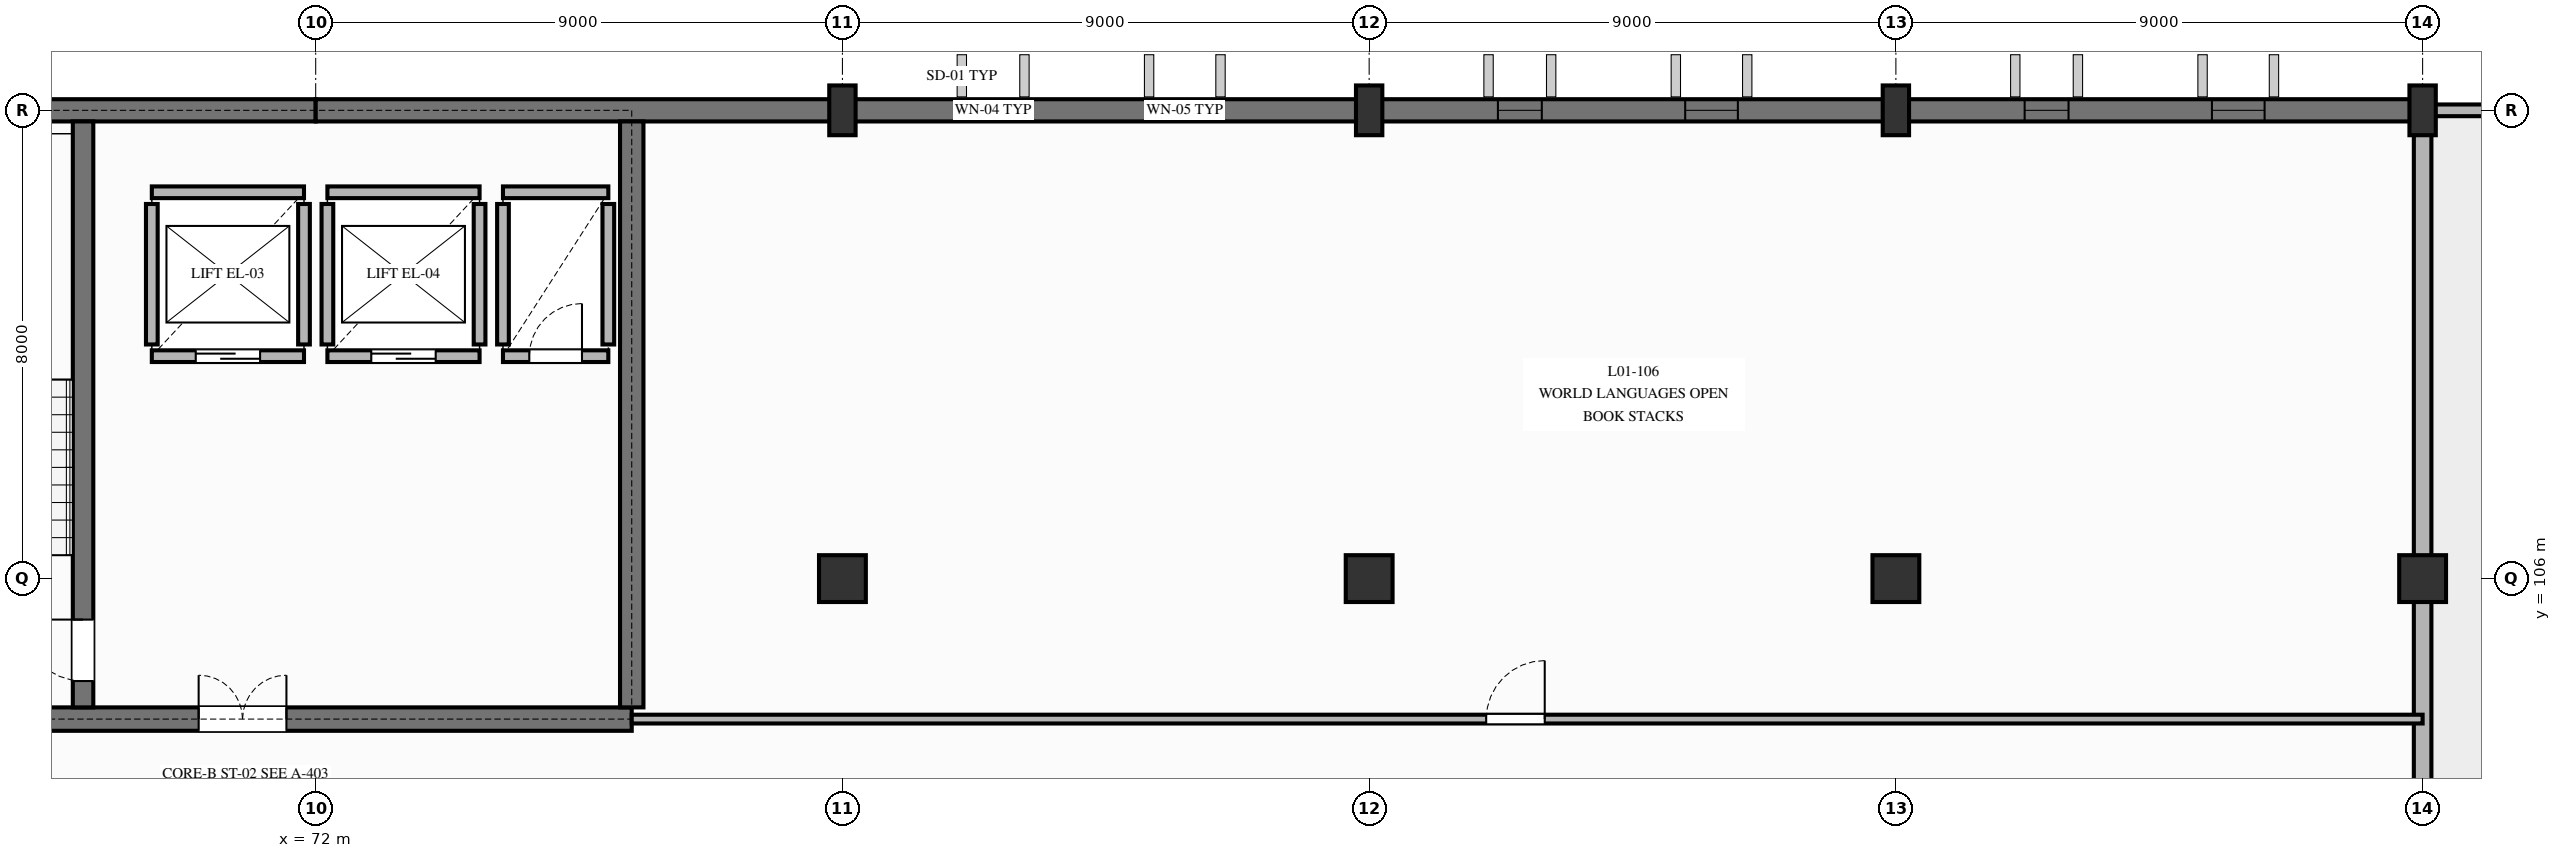
"""IFC4 building model, lengths in metres.
Left out: names, types, materials, properties, quantities, classifications, styles, units other than length and angle.
Written with IfcOpenShell. Run it as: python <this file> out.ifc"""

import sys

from ifc_helpers import new_model, si_unit, direction, frame, frame_2d, origin, origin_2d, place, context, subcontext, project, spatial, rectangle, extrude, element, fill, save


model = new_model("IFC4")
c1 = context("Model", 3, precision=1e-05, world=origin(), true_north=direction((0.0, 1.0)))
c2 = subcontext(c1, "Body", "Model", "MODEL_VIEW")
j1 = project(units=[si_unit("LENGTHUNIT", "METRE"), si_unit("PLANEANGLEUNIT", "RADIAN")], contexts=[c1])
p1 = place(None, origin())
s1 = spatial("IfcSite", under=j1, at=p1, CompositionType="ELEMENT")
p2 = place(p1, origin())
s2 = spatial("IfcBuilding", under=s1, at=p2, CompositionType="ELEMENT")
p3 = place(p2, frame((0.0, 0.0, 5.1)))
s3 = spatial("IfcBuildingStorey", under=s2, at=p3, CompositionType="ELEMENT", Elevation=5.1)
p4 = place(p3, frame((81.0, 106.0, 0.0), z_axis=(0.0, 0.0, 1.0), x_axis=(1.0, 0.0, 0.0)))
e1 = element("IfcColumn", 1, at=p4, inside=s3, PredefinedType="COLUMN", context=c2, shape_type="SweptSolid", body=[
    extrude(rectangle(XDim=0.8, YDim=0.8, at=origin_2d()), origin(), (0.0, 0.0, 1.0), 3.84),
])
p5 = place(p3, frame((81.0, 114.0, 0.0), z_axis=(0.0, 0.0, 1.0), x_axis=(0.0, 1.0, 0.0)))
e2 = element("IfcColumn", 2, at=p5, inside=s3, PredefinedType="COLUMN", context=c2, shape_type="SweptSolid", body=[
    extrude(rectangle(XDim=0.45, YDim=0.85, at=origin_2d()), origin(), (0.0, 0.0, 1.0), 3.84),
])
p6 = place(p3, frame((90.0, 106.0, 0.0), z_axis=(0.0, 0.0, 1.0), x_axis=(1.0, 0.0, 0.0)))
e3 = element("IfcColumn", 3, at=p6, inside=s3, PredefinedType="COLUMN", context=c2, shape_type="SweptSolid", body=[
    extrude(rectangle(XDim=0.8, YDim=0.8, at=origin_2d()), origin(), (0.0, 0.0, 1.0), 3.84),
])
p7 = place(p3, frame((90.0, 114.0, 0.0), z_axis=(0.0, 0.0, 1.0), x_axis=(0.0, 1.0, 0.0)))
e4 = element("IfcColumn", 4, at=p7, inside=s3, PredefinedType="COLUMN", context=c2, shape_type="SweptSolid", body=[
    extrude(rectangle(XDim=0.45, YDim=0.85, at=origin_2d()), origin(), (0.0, 0.0, 1.0), 3.84),
])
p8 = place(p3, frame((99.0, 106.0, 0.0), z_axis=(0.0, 0.0, 1.0), x_axis=(1.0, 0.0, 0.0)))
e5 = element("IfcColumn", 5, at=p8, inside=s3, PredefinedType="COLUMN", context=c2, shape_type="SweptSolid", body=[
    extrude(rectangle(XDim=0.8, YDim=0.8, at=origin_2d()), origin(), (0.0, 0.0, 1.0), 3.84),
])
p9 = place(p3, frame((99.0, 114.0, 0.0), z_axis=(0.0, 0.0, 1.0), x_axis=(0.0, 1.0, 0.0)))
e6 = element("IfcColumn", 6, at=p9, inside=s3, PredefinedType="COLUMN", context=c2, shape_type="SweptSolid", body=[
    extrude(rectangle(XDim=0.45, YDim=0.85, at=origin_2d()), origin(), (0.0, 0.0, 1.0), 3.84),
])
p10 = place(p3, frame((108.0, 106.0, 0.0), z_axis=(0.0, 0.0, 1.0), x_axis=(1.0, 0.0, 0.0)))
e7 = element("IfcColumn", 7, at=p10, inside=s3, PredefinedType="COLUMN", context=c2, shape_type="SweptSolid", body=[
    extrude(rectangle(XDim=0.8, YDim=0.8, at=origin_2d()), origin(), (0.0, 0.0, 1.0), 3.84),
])
p11 = place(p3, frame((108.0, 114.0, 0.0), z_axis=(0.0, 0.0, 1.0), x_axis=(0.0, 1.0, 0.0)))
e8 = element("IfcColumn", 8, at=p11, inside=s3, PredefinedType="COLUMN", context=c2, shape_type="SweptSolid", body=[
    extrude(rectangle(XDim=0.45, YDim=0.85, at=origin_2d()), origin(), (0.0, 0.0, 1.0), 3.84),
])
for number, where, z_axis, x_axis in (
    (9, (63.0, 114.0, 0.0), (0.0, 0.0, 1.0), (1.0, 0.0, 0.0)),
    (10, (72.0, 114.0, 0.0), (0.0, 0.0, 1.0), (1.0, 0.0, 0.0)),
):
    element("IfcWall", number, at=place(p3, frame(where, z_axis=z_axis, x_axis=x_axis)), inside=s3, PredefinedType="SOLIDWALL", context=c2, shape_type="SweptSolid", body=[
        extrude(rectangle(XDim=9.0, YDim=0.38, at=frame_2d((4.5, 0.0))), origin(), (0.0, 0.0, 1.0), 3.55),
    ])
p12 = place(p3, frame((81.0, 114.0, 0.0), z_axis=(0.0, 0.0, 1.0), x_axis=(1.0, 0.0, 0.0)))
e11 = element("IfcWall", 11, at=p12, inside=s3, PredefinedType="SOLIDWALL", context=c2, shape_type="SweptSolid", body=[
    extrude(rectangle(XDim=9.0, YDim=0.38, at=frame_2d((4.5, 0.0))), origin(), (0.0, 0.0, 1.0), 3.55),
])
p13 = place(p12, frame((2.2, 0.0, 0.615)))
e12 = element("IfcOpeningElement", 12, at=p13, cuts=e11, PredefinedType="OPENING", context=c2, shape_type="SweptSolid", body=[
    extrude(rectangle(XDim=0.75, YDim=2.2, at=frame_2d((0.375, 1.1))), frame((0.0, 0.2, 0.0), z_axis=(0.0, -1.0, 0.0), x_axis=(1.0, 0.0, 0.0)), (0.0, 0.0, 1.0), 0.4),
])
p14 = place(p12, frame((5.4, 0.0, 0.615)))
e13 = element("IfcOpeningElement", 13, at=p14, cuts=e11, PredefinedType="OPENING", context=c2, shape_type="SweptSolid", body=[
    extrude(rectangle(XDim=0.9, YDim=2.2, at=frame_2d((0.45, 1.1))), frame((0.0, 0.2, 0.0), z_axis=(0.0, -1.0, 0.0), x_axis=(1.0, 0.0, 0.0)), (0.0, 0.0, 1.0), 0.4),
])
p15 = place(p3, frame((90.0, 114.0, 0.0), z_axis=(0.0, 0.0, 1.0), x_axis=(1.0, 0.0, 0.0)))
e14 = element("IfcWall", 14, at=p15, inside=s3, PredefinedType="SOLIDWALL", context=c2, shape_type="SweptSolid", body=[
    extrude(rectangle(XDim=9.0, YDim=0.38, at=frame_2d((4.5, 0.0))), origin(), (0.0, 0.0, 1.0), 3.55),
])
p16 = place(p15, frame((2.2, 0.0, 0.615)))
e15 = element("IfcOpeningElement", 15, at=p16, cuts=e14, PredefinedType="OPENING", context=c2, shape_type="SweptSolid", body=[
    extrude(rectangle(XDim=0.75, YDim=2.2, at=frame_2d((0.375, 1.1))), frame((0.0, 0.2, 0.0), z_axis=(0.0, -1.0, 0.0), x_axis=(1.0, 0.0, 0.0)), (0.0, 0.0, 1.0), 0.4),
])
p17 = place(p15, frame((5.4, 0.0, 0.615)))
e16 = element("IfcOpeningElement", 16, at=p17, cuts=e14, PredefinedType="OPENING", context=c2, shape_type="SweptSolid", body=[
    extrude(rectangle(XDim=0.9, YDim=2.2, at=frame_2d((0.45, 1.1))), frame((0.0, 0.2, 0.0), z_axis=(0.0, -1.0, 0.0), x_axis=(1.0, 0.0, 0.0)), (0.0, 0.0, 1.0), 0.4),
])
p18 = place(p3, frame((99.0, 114.0, 0.0), z_axis=(0.0, 0.0, 1.0), x_axis=(1.0, 0.0, 0.0)))
e17 = element("IfcWall", 17, at=p18, inside=s3, PredefinedType="SOLIDWALL", context=c2, shape_type="SweptSolid", body=[
    extrude(rectangle(XDim=9.0, YDim=0.38, at=frame_2d((4.5, 0.0))), origin(), (0.0, 0.0, 1.0), 3.55),
])
p19 = place(p18, frame((2.2, 0.0, 0.575)))
e18 = element("IfcOpeningElement", 18, at=p19, cuts=e17, PredefinedType="OPENING", context=c2, shape_type="SweptSolid", body=[
    extrude(rectangle(XDim=0.75, YDim=2.2, at=frame_2d((0.375, 1.1))), frame((0.0, 0.2, 0.0), z_axis=(0.0, -1.0, 0.0), x_axis=(1.0, 0.0, 0.0)), (0.0, 0.0, 1.0), 0.4),
])
p20 = place(p18, frame((5.4, 0.0, 0.575)))
e19 = element("IfcOpeningElement", 19, at=p20, cuts=e17, PredefinedType="OPENING", context=c2, shape_type="SweptSolid", body=[
    extrude(rectangle(XDim=0.9, YDim=2.2, at=frame_2d((0.45, 1.1))), frame((0.0, 0.2, 0.0), z_axis=(0.0, -1.0, 0.0), x_axis=(1.0, 0.0, 0.0)), (0.0, 0.0, 1.0), 0.4),
])
p21 = place(p3, frame((108.0, 82.2, 0.0), z_axis=(0.0, 0.0, 1.0), x_axis=(0.0, 1.0, 0.0)))
e20 = element("IfcWall", 20, at=p21, inside=s3, PredefinedType="SOLIDWALL", context=c2, shape_type="SweptSolid", body=[
    extrude(rectangle(XDim=31.8, YDim=0.3, at=frame_2d((15.9, 0.0))), origin(), (0.0, 0.0, 1.0), 2.815),
])
p22 = place(p21, frame((3.2, 0.0, 0.595)))
e21 = element("IfcOpeningElement", 21, at=p22, cuts=e20, PredefinedType="OPENING", context=c2, shape_type="SweptSolid", body=[
    extrude(rectangle(XDim=1.5, YDim=2.1, at=frame_2d((0.75, 1.05))), frame((0.0, 0.16, 0.0), z_axis=(0.0, -1.0, 0.0), x_axis=(1.0, 0.0, 0.0)), (0.0, 0.0, 1.0), 0.32),
])
p23 = place(p21, frame((10.5, 0.0, 0.845)))
e22 = element("IfcOpeningElement", 22, at=p23, cuts=e20, PredefinedType="OPENING", context=c2, shape_type="SweptSolid", body=[
    extrude(rectangle(XDim=1.35, YDim=1.85, at=frame_2d((0.675, 0.925))), frame((0.0, 0.16, 0.0), z_axis=(0.0, -1.0, 0.0), x_axis=(1.0, 0.0, 0.0)), (0.0, 0.0, 1.0), 0.32),
])
p24 = place(p3, frame((145.8, 114.0, 0.0), z_axis=(0.0, 0.0, 1.0), x_axis=(-1.0, 0.0, 0.0)))
e23 = element("IfcWall", 23, at=p24, inside=s3, PredefinedType="PARAPET", context=c2, shape_type="SweptSolid", body=[
    extrude(rectangle(XDim=37.6, YDim=0.2, at=frame_2d((18.8, 0.0))), origin(), (0.0, 0.0, 1.0), 0.72),
])
p25 = place(p3, frame((64.2, 103.6, 0.0), z_axis=(0.0, 0.0, 1.0), x_axis=(1.0, 0.0, 0.0)))
e24 = element("IfcWall", 24, at=p25, inside=s3, PredefinedType="SHEAR", context=c2, shape_type="SweptSolid", body=[
    extrude(rectangle(XDim=13.2, YDim=0.4, at=frame_2d((6.6, 0.0))), origin(), (0.0, 0.0, 1.0), 3.55),
])
p26 = place(p25, frame((5.8, 0.0, 0.0)))
e25 = element("IfcOpeningElement", 25, at=p26, cuts=e24, PredefinedType="OPENING", context=c2, shape_type="SweptSolid", body=[
    extrude(rectangle(XDim=1.5, YDim=2.2, at=frame_2d((0.75, 1.1))), frame((0.0, 0.21, 0.0), z_axis=(0.0, -1.0, 0.0), x_axis=(1.0, 0.0, 0.0)), (0.0, 0.0, 1.0), 0.42),
])
p27 = place(p3, frame((77.4, 103.8, 0.0), z_axis=(0.0, 0.0, 1.0), x_axis=(0.0, 1.0, 0.0)))
e26 = element("IfcWall", 26, at=p27, inside=s3, PredefinedType="SHEAR", context=c2, shape_type="SweptSolid", body=[
    extrude(rectangle(XDim=10.01, YDim=0.4, at=frame_2d((5.005, 0.0))), origin(), (0.0, 0.0, 1.0), 3.55),
])
p28 = place(p3, frame((68.025, 103.8, 0.0), z_axis=(0.0, 0.0, 1.0), x_axis=(0.0, 1.0, 0.0)))
e27 = element("IfcWall", 27, at=p28, inside=s3, PredefinedType="SHEAR", context=c2, shape_type="SweptSolid", body=[
    extrude(rectangle(XDim=10.01, YDim=0.35, at=frame_2d((5.005, 0.0))), origin(), (0.0, 0.0, 1.0), 3.55),
])
p29 = place(p28, frame((0.45, 0.0, 0.0)))
e28 = element("IfcOpeningElement", 28, at=p29, cuts=e27, PredefinedType="OPENING", context=c2, shape_type="SweptSolid", body=[
    extrude(rectangle(XDim=1.05, YDim=2.2, at=frame_2d((0.525, 1.1))), frame((0.0, 0.185, 0.0), z_axis=(0.0, -1.0, 0.0), x_axis=(1.0, 0.0, 0.0)), (0.0, 0.0, 1.0), 0.37),
])
p30 = place(p3, frame((69.2, 109.8, 0.0), z_axis=(0.0, 0.0, 1.0), x_axis=(1.0, 0.0, 0.0)))
e29 = element("IfcWall", 29, at=p30, inside=s3, PredefinedType="PARTITIONING", context=c2, shape_type="SweptSolid", body=[
    extrude(rectangle(XDim=2.6, YDim=0.2, at=frame_2d((1.3, 0.0))), origin(), (0.0, 0.0, 1.0), 3.55),
])
p31 = place(p30, frame((0.75, 0.0, 0.0)))
e30 = element("IfcOpeningElement", 30, at=p31, cuts=e29, PredefinedType="OPENING", context=c2, shape_type="SweptSolid", body=[
    extrude(rectangle(XDim=1.1, YDim=2.15, at=frame_2d((0.55, 1.075))), frame((0.0, 0.11, 0.0), z_axis=(0.0, -1.0, 0.0), x_axis=(1.0, 0.0, 0.0)), (0.0, 0.0, 1.0), 0.22),
])
p32 = place(p3, frame((69.2, 112.6, 0.0), z_axis=(0.0, 0.0, 1.0), x_axis=(1.0, 0.0, 0.0)))
e31 = element("IfcWall", 31, at=p32, inside=s3, PredefinedType="PARTITIONING", context=c2, shape_type="SweptSolid", body=[
    extrude(rectangle(XDim=2.6, YDim=0.2, at=frame_2d((1.3, 0.0))), origin(), (0.0, 0.0, 1.0), 3.55),
])
for number, where, z_axis, x_axis in (
    (32, (69.2, 110.0, 0.0), (0.0, 0.0, 1.0), (0.0, 1.0, 0.0)),
    (33, (71.8, 110.0, 0.0), (0.0, 0.0, 1.0), (0.0, 1.0, 0.0)),
):
    element("IfcWall", number, at=place(p3, frame(where, z_axis=z_axis, x_axis=x_axis)), inside=s3, PredefinedType="PARTITIONING", context=c2, shape_type="SweptSolid", body=[
        extrude(rectangle(XDim=2.4, YDim=0.2, at=frame_2d((1.2, 0.0))), origin(), (0.0, 0.0, 1.0), 3.55),
    ])
p33 = place(p3, frame((72.2, 109.8, 0.0), z_axis=(0.0, 0.0, 1.0), x_axis=(1.0, 0.0, 0.0)))
e34 = element("IfcWall", 34, at=p33, inside=s3, PredefinedType="PARTITIONING", context=c2, shape_type="SweptSolid", body=[
    extrude(rectangle(XDim=2.6, YDim=0.2, at=frame_2d((1.3, 0.0))), origin(), (0.0, 0.0, 1.0), 3.55),
])
p34 = place(p33, frame((0.75, 0.0, 0.0)))
e35 = element("IfcOpeningElement", 35, at=p34, cuts=e34, PredefinedType="OPENING", context=c2, shape_type="SweptSolid", body=[
    extrude(rectangle(XDim=1.1, YDim=2.15, at=frame_2d((0.55, 1.075))), frame((0.0, 0.11, 0.0), z_axis=(0.0, -1.0, 0.0), x_axis=(1.0, 0.0, 0.0)), (0.0, 0.0, 1.0), 0.22),
])
p35 = place(p3, frame((72.2, 112.6, 0.0), z_axis=(0.0, 0.0, 1.0), x_axis=(1.0, 0.0, 0.0)))
e36 = element("IfcWall", 36, at=p35, inside=s3, PredefinedType="PARTITIONING", context=c2, shape_type="SweptSolid", body=[
    extrude(rectangle(XDim=2.6, YDim=0.2, at=frame_2d((1.3, 0.0))), origin(), (0.0, 0.0, 1.0), 3.55),
])
for number, where, z_axis, x_axis in (
    (37, (72.2, 110.0, 0.0), (0.0, 0.0, 1.0), (0.0, 1.0, 0.0)),
    (38, (74.8, 110.0, 0.0), (0.0, 0.0, 1.0), (0.0, 1.0, 0.0)),
):
    element("IfcWall", number, at=place(p3, frame(where, z_axis=z_axis, x_axis=x_axis)), inside=s3, PredefinedType="PARTITIONING", context=c2, shape_type="SweptSolid", body=[
        extrude(rectangle(XDim=2.4, YDim=0.2, at=frame_2d((1.2, 0.0))), origin(), (0.0, 0.0, 1.0), 3.55),
    ])
p36 = place(p3, frame((75.2, 109.8, 0.0), z_axis=(0.0, 0.0, 1.0), x_axis=(1.0, 0.0, 0.0)))
e39 = element("IfcWall", 39, at=p36, inside=s3, PredefinedType="PARTITIONING", context=c2, shape_type="SweptSolid", body=[
    extrude(rectangle(XDim=1.8, YDim=0.2, at=frame_2d((0.9, 0.0))), origin(), (0.0, 0.0, 1.0), 3.55),
])
p37 = place(p36, frame((0.45, 0.0, 0.0)))
e40 = element("IfcOpeningElement", 40, at=p37, cuts=e39, PredefinedType="OPENING", context=c2, shape_type="SweptSolid", body=[
    extrude(rectangle(XDim=0.9, YDim=2.1, at=frame_2d((0.45, 1.05))), frame((0.0, 0.11, 0.0), z_axis=(0.0, -1.0, 0.0), x_axis=(1.0, 0.0, 0.0)), (0.0, 0.0, 1.0), 0.22),
])
p38 = place(p3, frame((75.2, 112.6, 0.0), z_axis=(0.0, 0.0, 1.0), x_axis=(1.0, 0.0, 0.0)))
e41 = element("IfcWall", 41, at=p38, inside=s3, PredefinedType="PARTITIONING", context=c2, shape_type="SweptSolid", body=[
    extrude(rectangle(XDim=1.8, YDim=0.2, at=frame_2d((0.9, 0.0))), origin(), (0.0, 0.0, 1.0), 3.55),
])
for number, where, z_axis, x_axis in (
    (42, (75.2, 110.0, 0.0), (0.0, 0.0, 1.0), (0.0, 1.0, 0.0)),
    (43, (77.0, 110.0, 0.0), (0.0, 0.0, 1.0), (0.0, 1.0, 0.0)),
):
    element("IfcWall", number, at=place(p3, frame(where, z_axis=z_axis, x_axis=x_axis)), inside=s3, PredefinedType="PARTITIONING", context=c2, shape_type="SweptSolid", body=[
        extrude(rectangle(XDim=2.4, YDim=0.2, at=frame_2d((1.2, 0.0))), origin(), (0.0, 0.0, 1.0), 3.55),
    ])
p39 = place(p3, frame((77.4, 103.6, 0.0), z_axis=(0.0, 0.0, 1.0), x_axis=(1.0, 0.0, 0.0)))
e44 = element("IfcWall", 44, at=p39, inside=s3, PredefinedType="PARTITIONING", context=c2, shape_type="SweptSolid", body=[
    extrude(rectangle(XDim=30.6, YDim=0.15, at=frame_2d((15.3, 0.0))), origin(), (0.0, 0.0, 1.0), 3.55),
])
p40 = place(p39, frame((14.6, 0.0, 0.0)))
e45 = element("IfcOpeningElement", 45, at=p40, cuts=e44, PredefinedType="OPENING", context=c2, shape_type="SweptSolid", body=[
    extrude(rectangle(XDim=1.0, YDim=2.15, at=frame_2d((0.5, 1.075))), frame((0.0, 0.085, 0.0), z_axis=(0.0, -1.0, 0.0), x_axis=(1.0, 0.0, 0.0)), (0.0, 0.0, 1.0), 0.17),
])
p41 = place(p13, origin())
e46 = element("IfcWindow", 46, at=p41, inside=s3, PartitioningType="SINGLE_PANEL", PredefinedType="WINDOW", context=c2, shape_type="SweptSolid", body=[
    extrude(rectangle(XDim=0.75, YDim=2.2, at=frame_2d((0.375, 1.1))), frame((0.0, 0.03, 0.0), z_axis=(0.0, -1.0, 0.0), x_axis=(1.0, 0.0, 0.0)), (0.0, 0.0, 1.0), 0.06),
])
fill(e12, e46)
p42 = place(p14, origin())
e47 = element("IfcWindow", 47, at=p42, inside=s3, PartitioningType="SINGLE_PANEL", PredefinedType="WINDOW", context=c2, shape_type="SweptSolid", body=[
    extrude(rectangle(XDim=0.9, YDim=2.2, at=frame_2d((0.45, 1.1))), frame((0.0, 0.03, 0.0), z_axis=(0.0, -1.0, 0.0), x_axis=(1.0, 0.0, 0.0)), (0.0, 0.0, 1.0), 0.06),
])
fill(e13, e47)
p43 = place(p16, origin())
e48 = element("IfcWindow", 48, at=p43, inside=s3, PartitioningType="SINGLE_PANEL", PredefinedType="WINDOW", context=c2, shape_type="SweptSolid", body=[
    extrude(rectangle(XDim=0.75, YDim=2.2, at=frame_2d((0.375, 1.1))), frame((0.0, 0.03, 0.0), z_axis=(0.0, -1.0, 0.0), x_axis=(1.0, 0.0, 0.0)), (0.0, 0.0, 1.0), 0.06),
])
fill(e15, e48)
p44 = place(p17, origin())
e49 = element("IfcWindow", 49, at=p44, inside=s3, PartitioningType="SINGLE_PANEL", PredefinedType="WINDOW", context=c2, shape_type="SweptSolid", body=[
    extrude(rectangle(XDim=0.9, YDim=2.2, at=frame_2d((0.45, 1.1))), frame((0.0, 0.03, 0.0), z_axis=(0.0, -1.0, 0.0), x_axis=(1.0, 0.0, 0.0)), (0.0, 0.0, 1.0), 0.06),
])
fill(e16, e49)
p45 = place(p19, origin())
e50 = element("IfcWindow", 50, at=p45, inside=s3, PartitioningType="SINGLE_PANEL", PredefinedType="WINDOW", context=c2, shape_type="SweptSolid", body=[
    extrude(rectangle(XDim=0.75, YDim=2.2, at=frame_2d((0.375, 1.1))), frame((0.0, 0.03, 0.0), z_axis=(0.0, -1.0, 0.0), x_axis=(1.0, 0.0, 0.0)), (0.0, 0.0, 1.0), 0.06),
])
fill(e18, e50)
p46 = place(p20, origin())
e51 = element("IfcWindow", 51, at=p46, inside=s3, PartitioningType="SINGLE_PANEL", PredefinedType="WINDOW", context=c2, shape_type="SweptSolid", body=[
    extrude(rectangle(XDim=0.9, YDim=2.2, at=frame_2d((0.45, 1.1))), frame((0.0, 0.03, 0.0), z_axis=(0.0, -1.0, 0.0), x_axis=(1.0, 0.0, 0.0)), (0.0, 0.0, 1.0), 0.06),
])
fill(e19, e51)
p47 = place(p26, origin())
e52 = element("IfcDoor", 52, at=p47, inside=s3, OperationType="DOUBLE_DOOR_SINGLE_SWING", PredefinedType="DOOR", context=c2, shape_type="SweptSolid", body=[
    extrude(rectangle(XDim=1.5, YDim=2.2, at=frame_2d((0.75, 1.1))), frame((0.0, 0.025, 0.0), z_axis=(0.0, -1.0, 0.0), x_axis=(1.0, 0.0, 0.0)), (0.0, 0.0, 1.0), 0.05),
])
fill(e25, e52)
p48 = place(p29, origin())
e53 = element("IfcDoor", 53, at=p48, inside=s3, OperationType="SINGLE_SWING_RIGHT", PredefinedType="DOOR", context=c2, shape_type="SweptSolid", body=[
    extrude(rectangle(XDim=1.05, YDim=2.2, at=frame_2d((0.525, 1.1))), frame((0.0, 0.025, 0.0), z_axis=(0.0, -1.0, 0.0), x_axis=(1.0, 0.0, 0.0)), (0.0, 0.0, 1.0), 0.05),
])
fill(e28, e53)
p49 = place(p31, origin())
e54 = element("IfcDoor", 54, at=p49, inside=s3, OperationType="SLIDING_TO_LEFT", PredefinedType="DOOR", context=c2, shape_type="SweptSolid", body=[
    extrude(rectangle(XDim=1.1, YDim=2.15, at=frame_2d((0.55, 1.075))), frame((0.0, 0.025, 0.0), z_axis=(0.0, -1.0, 0.0), x_axis=(1.0, 0.0, 0.0)), (0.0, 0.0, 1.0), 0.05),
])
fill(e30, e54)
p50 = place(p34, origin())
e55 = element("IfcDoor", 55, at=p50, inside=s3, OperationType="SLIDING_TO_RIGHT", PredefinedType="DOOR", context=c2, shape_type="SweptSolid", body=[
    extrude(rectangle(XDim=1.1, YDim=2.15, at=frame_2d((0.55, 1.075))), frame((0.0, 0.025, 0.0), z_axis=(0.0, -1.0, 0.0), x_axis=(1.0, 0.0, 0.0)), (0.0, 0.0, 1.0), 0.05),
])
fill(e35, e55)
p51 = place(p37, origin())
e56 = element("IfcDoor", 56, at=p51, inside=s3, OperationType="SINGLE_SWING_RIGHT", PredefinedType="DOOR", context=c2, shape_type="SweptSolid", body=[
    extrude(rectangle(XDim=0.9, YDim=2.1, at=frame_2d((0.45, 1.05))), frame((0.0, 0.025, 0.0), z_axis=(0.0, -1.0, 0.0), x_axis=(1.0, 0.0, 0.0)), (0.0, 0.0, 1.0), 0.05),
])
fill(e40, e56)
p52 = place(p40, origin())
e57 = element("IfcDoor", 57, at=p52, inside=s3, OperationType="SINGLE_SWING_RIGHT", PredefinedType="DOOR", context=c2, shape_type="SweptSolid", body=[
    extrude(rectangle(XDim=1.0, YDim=2.15, at=frame_2d((0.5, 1.075))), frame((0.0, 0.025, 0.0), z_axis=(0.0, -1.0, 0.0), x_axis=(1.0, 0.0, 0.0)), (0.0, 0.0, 1.0), 0.05),
])
fill(e45, e57)
save(model, sys.argv[1])
